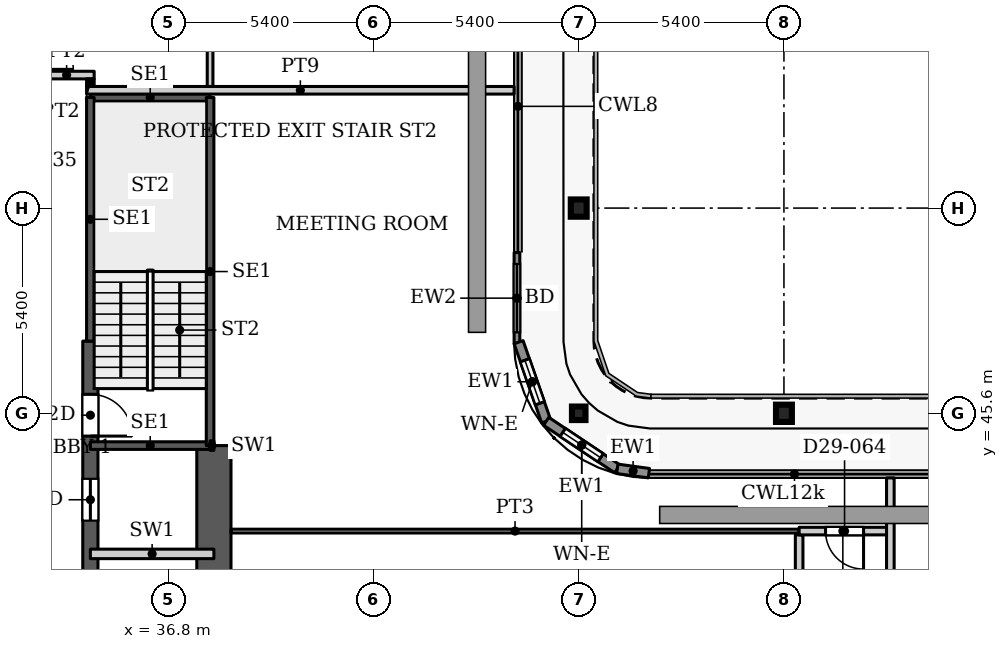
"""IFC4 building model, lengths in metres.
Left out: names, types, materials, properties, quantities, classifications, styles, units other than length and angle.
Written with IfcOpenShell. Run it as: python <this file> out.ifc"""

import sys

from ifc_helpers import new_model, si_unit, direction, frame, frame_2d, origin, origin_2d, place, context, subcontext, project, spatial, rectangle, hollow_rectangle, i_section, extrude, source, transform, mapped, element, fill, save


model = new_model("IFC4")
c1 = context("Model", 3, precision=1e-05, world=origin(), true_north=direction((0.0, 1.0)))
c2 = subcontext(c1, "Body", "Model", "MODEL_VIEW")
j1 = project(units=[si_unit("LENGTHUNIT", "METRE"), si_unit("PLANEANGLEUNIT", "RADIAN")], contexts=[c1])
p1 = place(None, origin())
s1 = spatial("IfcSite", under=j1, at=p1, CompositionType="ELEMENT")
p2 = place(p1, origin())
s2 = spatial("IfcBuilding", under=s1, at=p2, CompositionType="ELEMENT")
p3 = place(p2, frame((0.0, 0.0, 129.2)))
s3 = spatial("IfcBuildingStorey", under=s2, at=p3, CompositionType="ELEMENT", Elevation=129.2)
for number, where, z_axis, x_axis in (
    (1, (53.0, 45.6, 0.0), (0.0, 0.0, 1.0), (1.0, 0.0, 0.0)),
    (2, (47.6, 51.0, 0.0), (0.0, 0.0, 1.0), (1.0, 0.0, 0.0)),
):
    element("IfcColumn", number, at=place(p3, frame(where, z_axis=z_axis, x_axis=x_axis)), inside=s3, PredefinedType="COLUMN", context=c2, shape_type="SweptSolid", body=[
        extrude(i_section(OverallWidth=0.418, OverallDepth=0.455, WebThickness=0.042, FlangeThickness=0.068, FilletRadius=0.014, at=origin_2d()), origin(), (0.0, 0.0, 1.0), 3.9),
    ])
p4 = place(p3, frame((47.6, 45.6, 0.0), z_axis=(0.0, 0.0, 1.0), x_axis=(1.0, 0.0, 0.0)))
e3 = element("IfcColumn", 3, at=p4, inside=s3, PredefinedType="COLUMN", context=c2, shape_type="SweptSolid", body=[
    extrude(hollow_rectangle(XDim=0.356, YDim=0.356, WallThickness=0.016, InnerFilletRadius=0.016, OuterFilletRadius=0.032, at=origin_2d()), origin(), (0.0, 0.0, 1.0), 3.9),
])
p5 = place(p3, frame((34.75, 29.05, 0.0), z_axis=(0.0, 0.0, 1.0), x_axis=(0.0, 1.0, 0.0)))
e4 = element("IfcWall", 4, at=p5, inside=s3, PredefinedType="SHEAR", context=c2, shape_type="SweptSolid", body=[
    extrude(rectangle(XDim=18.45, YDim=0.4, at=frame_2d((9.225, 0.0))), origin(), (0.0, 0.0, 1.0), 3.9),
])
p6 = place(p5, frame((8.025, 0.0, 0.0)))
e5 = element("IfcOpeningElement", 5, at=p6, cuts=e4, PredefinedType="OPENING", context=c2, shape_type="SweptSolid", body=[
    extrude(rectangle(XDim=1.1, YDim=2.2, at=frame_2d((0.55, 1.1))), frame((0.0, 0.21, 0.0), z_axis=(0.0, -1.0, 0.0), x_axis=(1.0, 0.0, 0.0)), (0.0, 0.0, 1.0), 0.42),
])
p7 = place(p5, frame((10.875, 0.0, 0.0)))
e6 = element("IfcOpeningElement", 6, at=p7, cuts=e4, PredefinedType="OPENING", context=c2, shape_type="SweptSolid", body=[
    extrude(rectangle(XDim=1.1, YDim=2.2, at=frame_2d((0.55, 1.1))), frame((0.0, 0.21, 0.0), z_axis=(0.0, -1.0, 0.0), x_axis=(1.0, 0.0, 0.0)), (0.0, 0.0, 1.0), 0.42),
])
p8 = place(p5, frame((13.725, 0.0, 0.0)))
e7 = element("IfcOpeningElement", 7, at=p8, cuts=e4, PredefinedType="OPENING", context=c2, shape_type="SweptSolid", body=[
    extrude(rectangle(XDim=1.1, YDim=2.2, at=frame_2d((0.55, 1.1))), frame((0.0, 0.21, 0.0), z_axis=(0.0, -1.0, 0.0), x_axis=(1.0, 0.0, 0.0)), (0.0, 0.0, 1.0), 0.42),
])
p9 = place(p5, frame((15.95, 0.0, 0.0)))
e8 = element("IfcOpeningElement", 8, at=p9, cuts=e4, PredefinedType="OPENING", context=c2, shape_type="SweptSolid", body=[
    extrude(rectangle(XDim=1.1, YDim=2.2, at=frame_2d((0.55, 1.1))), frame((0.0, 0.21, 0.0), z_axis=(0.0, -1.0, 0.0), x_axis=(1.0, 0.0, 0.0)), (0.0, 0.0, 1.0), 0.42),
])
p10 = place(p3, frame((38.0, 36.2, 0.0), z_axis=(0.0, 0.0, 1.0), x_axis=(0.0, 1.0, 0.0)))
e9 = element("IfcWall", 9, at=p10, inside=s3, PredefinedType="SHEAR", context=c2, shape_type="SweptSolid", body=[
    extrude(rectangle(XDim=8.55, YDim=0.9, at=frame_2d((4.275, 0.0))), origin(), (0.0, 0.0, 1.0), 3.9),
])
p11 = place(p3, frame((45.975, 49.83, 0.0), z_axis=(0.0, 0.0, 1.0), x_axis=(0.0, -1.0, 0.0)))
e10 = element("IfcWall", 10, at=p11, inside=s3, PredefinedType="SOLIDWALL", context=c2, shape_type="SweptSolid", body=[
    extrude(rectangle(XDim=2.4, YDim=0.15, at=frame_2d((1.2, 0.0))), origin(), (0.0, 0.0, 1.0), 3.75),
])
p12 = place(p11, frame((0.3, 0.0, 0.0)))
e11 = element("IfcOpeningElement", 11, at=p12, cuts=e10, PredefinedType="OPENING", context=c2, shape_type="SweptSolid", body=[
    extrude(rectangle(XDim=1.8, YDim=2.4, at=frame_2d((0.9, 1.2))), frame((0.0, 0.085, 0.0), z_axis=(0.0, -1.0, 0.0), x_axis=(1.0, 0.0, 0.0)), (0.0, 0.0, 1.0), 0.17),
])
p13 = place(p3, frame((46.018, 47.471, 0.0), z_axis=(0.0, 0.0, 1.0), x_axis=(0.328791208903, -0.944402637093, 0.0)))
e12 = element("IfcWall", 12, at=p13, inside=s3, PredefinedType="SOLIDWALL", context=c2, shape_type="SweptSolid", body=[
    extrude(rectangle(XDim=2.205, YDim=0.25, at=frame_2d((1.102, 0.0))), origin(), (0.0, 0.0, 1.0), 3.75),
])
p14 = place(p13, frame((0.503, 0.0, 0.6)))
e13 = element("IfcOpeningElement", 13, at=p14, cuts=e12, PredefinedType="OPENING", context=c2, shape_type="SweptSolid", body=[
    extrude(rectangle(XDim=1.2, YDim=2.1, at=frame_2d((0.6, 1.05))), frame((0.0, 0.135, 0.0), z_axis=(0.0, -1.0, 0.0), x_axis=(1.0, 0.0, 0.0)), (0.0, 0.0, 1.0), 0.27),
])
p15 = place(p3, frame((46.743, 45.389, 0.0), z_axis=(0.0, 0.0, 1.0), x_axis=(0.831449265529, -0.555600682912, 0.0)))
e14 = element("IfcWall", 14, at=p15, inside=s3, PredefinedType="SOLIDWALL", context=c2, shape_type="SweptSolid", body=[
    extrude(rectangle(XDim=2.251, YDim=0.25, at=frame_2d((1.126, 0.0))), origin(), (0.0, 0.0, 1.0), 3.75),
])
p16 = place(p15, frame((0.525, 0.0, 0.6)))
e15 = element("IfcOpeningElement", 15, at=p16, cuts=e14, PredefinedType="OPENING", context=c2, shape_type="SweptSolid", body=[
    extrude(rectangle(XDim=1.2, YDim=2.1, at=frame_2d((0.6, 1.05))), frame((0.0, 0.135, 0.0), z_axis=(0.0, -1.0, 0.0), x_axis=(1.0, 0.0, 0.0)), (0.0, 0.0, 1.0), 0.27),
])
p17 = place(p3, frame((48.615, 44.138, 0.0), z_axis=(0.0, 0.0, 1.0), x_axis=(0.990741504246, -0.135761819977, 0.0)))
e16 = element("IfcWall", 16, at=p17, inside=s3, PredefinedType="SOLIDWALL", context=c2, shape_type="SweptSolid", body=[
    extrude(rectangle(XDim=0.84, YDim=0.25, at=frame_2d((0.42, 0.0))), origin(), (0.0, 0.0, 1.0), 3.75),
])
for number, where, z_axis, x_axis in (
    (17, (34.75, 44.75, 0.0), (0.0, 0.0, 1.0), (1.0, 0.0, 0.0)),
    (18, (34.75, 53.91, 0.0), (0.0, 0.0, 1.0), (1.0, 0.0, 0.0)),
):
    element("IfcWall", number, at=place(p3, frame(where, z_axis=z_axis, x_axis=x_axis)), inside=s3, PredefinedType="SHEAR", context=c2, shape_type="SweptSolid", body=[
        extrude(rectangle(XDim=3.15, YDim=0.2, at=frame_2d((1.575, 0.0))), origin(), (0.0, 0.0, 1.0), 3.9),
    ])
p18 = place(p3, frame((34.75, 47.5, 0.0), z_axis=(0.0, 0.0, 1.0), x_axis=(0.0, 1.0, 0.0)))
e19 = element("IfcWall", 19, at=p18, inside=s3, PredefinedType="SHEAR", context=c2, shape_type="SweptSolid", body=[
    extrude(rectangle(XDim=6.41, YDim=0.2, at=frame_2d((3.205, 0.0))), origin(), (0.0, 0.0, 1.0), 3.9),
])
p19 = place(p3, frame((37.9, 44.75, 0.0), z_axis=(0.0, 0.0, 1.0), x_axis=(0.0, 1.0, 0.0)))
e20 = element("IfcWall", 20, at=p19, inside=s3, PredefinedType="SHEAR", context=c2, shape_type="SweptSolid", body=[
    extrude(rectangle(XDim=9.16, YDim=0.2, at=frame_2d((4.58, 0.0))), origin(), (0.0, 0.0, 1.0), 3.9),
])
p20 = place(p3, frame((34.75, 41.9, 0.0), z_axis=(0.0, 0.0, 1.0), x_axis=(1.0, 0.0, 0.0)))
e21 = element("IfcWall", 21, at=p20, inside=s3, PredefinedType="PARTITIONING", context=c2, shape_type="SweptSolid", body=[
    extrude(rectangle(XDim=3.25, YDim=0.25, at=frame_2d((1.625, 0.0))), origin(), (0.0, 0.0, 1.0), 3.9),
])
p21 = place(p3, frame((37.9, 44.75, 0.0), z_axis=(0.0, 0.0, 1.0), x_axis=(1.0, 0.0, 0.0)))
e22 = element("IfcWall", 22, at=p21, inside=s3, PredefinedType="PARTITIONING", context=c2, shape_type="SweptSolid", body=[
    extrude(rectangle(XDim=0.1, YDim=0.25, at=frame_2d((0.05, 0.0))), origin(), (0.0, 0.0, 1.0), 3.9),
])
p22 = place(p3, frame((33.4, 54.5, 0.0), z_axis=(0.0, 0.0, 1.0), x_axis=(1.0, 0.0, 0.0)))
e23 = element("IfcWall", 23, at=p22, inside=s3, PredefinedType="PARTITIONING", context=c2, shape_type="SweptSolid", body=[
    extrude(rectangle(XDim=1.45, YDim=0.2, at=frame_2d((0.725, 0.0))), origin(), (0.0, 0.0, 1.0), 3.6),
])
p23 = place(p3, frame((34.65, 54.1, 0.0), z_axis=(0.0, 0.0, 1.0), x_axis=(1.0, 0.0, 0.0)))
e24 = element("IfcWall", 24, at=p23, inside=s3, PredefinedType="PARTITIONING", context=c2, shape_type="SweptSolid", body=[
    extrude(rectangle(XDim=11.25, YDim=0.2, at=frame_2d((5.625, 0.0))), origin(), (0.0, 0.0, 1.0), 3.6),
])
p24 = place(p3, frame((34.75, 54.2, 0.0), z_axis=(0.0, 0.0, 1.0), x_axis=(0.0, 1.0, 0.0)))
e25 = element("IfcWall", 25, at=p24, inside=s3, PredefinedType="PARTITIONING", context=c2, shape_type="SweptSolid", body=[
    extrude(rectangle(XDim=0.2, YDim=0.2, at=frame_2d((0.1, 0.0))), origin(), (0.0, 0.0, 1.0), 3.6),
])
p25 = place(p3, frame((37.9, 54.2, 0.0), z_axis=(0.0, 0.0, 1.0), x_axis=(0.0, 1.0, 0.0)))
e26 = element("IfcWall", 26, at=p25, inside=s3, PredefinedType="PARTITIONING", context=c2, shape_type="SweptSolid", body=[
    extrude(rectangle(XDim=9.4, YDim=0.15, at=frame_2d((4.7, 0.0))), origin(), (0.0, 0.0, 1.0), 3.6),
])
p26 = place(p25, frame((7.1, 0.0, 0.0)))
e27 = element("IfcOpeningElement", 27, at=p26, cuts=e26, PredefinedType="OPENING", context=c2, shape_type="SweptSolid", body=[
    extrude(rectangle(XDim=0.9, YDim=2.1, at=frame_2d((0.45, 1.05))), frame((0.0, 0.085, 0.0), z_axis=(0.0, -1.0, 0.0), x_axis=(1.0, 0.0, 0.0)), (0.0, 0.0, 1.0), 0.17),
])
p27 = place(p25, frame((2.25, 0.0, 0.0)))
e28 = element("IfcOpeningElement", 28, at=p27, cuts=e26, PredefinedType="OPENING", context=c2, shape_type="SweptSolid", body=[
    extrude(rectangle(XDim=1.0, YDim=2.1, at=frame_2d((0.5, 1.05))), frame((0.0, 0.085, 0.0), z_axis=(0.0, -1.0, 0.0), x_axis=(1.0, 0.0, 0.0)), (0.0, 0.0, 1.0), 0.17),
])
p28 = place(p3, frame((38.449, 42.5, 0.0), z_axis=(0.0, 0.0, 1.0), x_axis=(1.0, 0.0, 0.0)))
e29 = element("IfcWall", 29, at=p28, inside=s3, PredefinedType="PARTITIONING", context=c2, shape_type="SweptSolid", body=[
    extrude(rectangle(XDim=14.951, YDim=0.1, at=frame_2d((7.476, 0.0))), origin(), (0.0, 0.0, 1.0), 3.6),
])
p29 = place(p3, frame((53.4, 36.199, 0.0), z_axis=(0.0, 0.0, 1.0), x_axis=(0.0, 1.0, 0.0)))
e30 = element("IfcWall", 30, at=p29, inside=s3, PredefinedType="PARTITIONING", context=c2, shape_type="SweptSolid", body=[
    extrude(rectangle(XDim=6.201, YDim=0.2, at=frame_2d((3.101, 0.0))), origin(), (0.0, 0.0, 1.0), 3.6),
])
p30 = place(p29, frame((3.707, 0.0, 0.0)))
e31 = element("IfcOpeningElement", 31, at=p30, cuts=e30, PredefinedType="OPENING", context=c2, shape_type="SweptSolid", body=[
    extrude(rectangle(XDim=1.0, YDim=2.1, at=frame_2d((0.5, 1.05))), frame((0.0, 0.11, 0.0), z_axis=(0.0, -1.0, 0.0), x_axis=(1.0, 0.0, 0.0)), (0.0, 0.0, 1.0), 0.22),
])
p31 = place(p3, frame((53.4, 42.5, 0.0), z_axis=(0.0, 0.0, 1.0), x_axis=(1.0, 0.0, 0.0)))
e32 = element("IfcWall", 32, at=p31, inside=s3, PredefinedType="PARTITIONING", context=c2, shape_type="SweptSolid", body=[
    extrude(rectangle(XDim=2.3, YDim=0.2, at=frame_2d((1.15, 0.0))), origin(), (0.0, 0.0, 1.0), 3.6),
])
p32 = place(p31, frame((0.695, 0.0, 0.0)))
e33 = element("IfcOpeningElement", 33, at=p32, cuts=e32, PredefinedType="OPENING", context=c2, shape_type="SweptSolid", body=[
    extrude(rectangle(XDim=1.0, YDim=2.1, at=frame_2d((0.5, 1.05))), frame((0.0, 0.11, 0.0), z_axis=(0.0, -1.0, 0.0), x_axis=(1.0, 0.0, 0.0)), (0.0, 0.0, 1.0), 0.22),
])
p33 = place(p3, frame((55.8, 30.4, 0.0), z_axis=(0.0, 0.0, 1.0), x_axis=(0.0, 1.0, 0.0)))
e34 = element("IfcWall", 34, at=p33, inside=s3, PredefinedType="PARTITIONING", context=c2, shape_type="SweptSolid", body=[
    extrude(rectangle(XDim=13.5, YDim=0.2, at=frame_2d((6.75, 0.0))), origin(), (0.0, 0.0, 1.0), 3.6),
])
m1 = source(origin(), c2, "Body", "SweptSolid", [
    extrude(rectangle(XDim=1.8, YDim=2.4, at=frame_2d((0.9, 1.2))), frame((0.0, 0.025, 0.0), z_axis=(0.0, -1.0, 0.0), x_axis=(1.0, 0.0, 0.0)), (0.0, 0.0, 1.0), 0.05),
])
p34 = place(p12, origin())
e35 = element("IfcDoor", 35, at=p34, inside=s3, OperationType="SLIDING_TO_LEFT", PredefinedType="DOOR", context=c2, shape_type="MappedRepresentation", body=[
    mapped(m1, transform((0.0, 0.0, 0.0), x_axis=(1.0, 0.0, 0.0), y_axis=(0.0, 1.0, 0.0), z_axis=(0.0, 0.0, 1.0), scale=1.0)),
])
fill(e11, e35)
m2 = source(origin(), c2, "Body", "SweptSolid", [
    extrude(rectangle(XDim=1.2, YDim=2.1, at=frame_2d((0.6, 1.05))), frame((0.0, 0.03, 0.0), z_axis=(0.0, -1.0, 0.0), x_axis=(1.0, 0.0, 0.0)), (0.0, 0.0, 1.0), 0.06),
])
p35 = place(p14, origin())
e36 = element("IfcWindow", 36, at=p35, inside=s3, PartitioningType="SINGLE_PANEL", PredefinedType="WINDOW", context=c2, shape_type="MappedRepresentation", body=[
    mapped(m2, transform((0.0, 0.0, 0.0), x_axis=(1.0, 0.0, 0.0), y_axis=(0.0, 1.0, 0.0), z_axis=(0.0, 0.0, 1.0), scale=1.0)),
])
fill(e13, e36)
p36 = place(p16, origin())
e37 = element("IfcWindow", 37, at=p36, inside=s3, PartitioningType="SINGLE_PANEL", PredefinedType="WINDOW", context=c2, shape_type="MappedRepresentation", body=[
    mapped(m2, transform((0.0, 0.0, 0.0), x_axis=(1.0, 0.0, 0.0), y_axis=(0.0, 1.0, 0.0), z_axis=(0.0, 0.0, 1.0), scale=1.0)),
])
fill(e15, e37)
m3 = source(origin(), c2, "Body", "SweptSolid", [
    extrude(rectangle(XDim=1.1, YDim=2.2, at=frame_2d((0.55, 1.1))), frame((0.0, 0.025, 0.0), z_axis=(0.0, -1.0, 0.0), x_axis=(1.0, 0.0, 0.0)), (0.0, 0.0, 1.0), 0.05),
])
p37 = place(p8, origin())
e38 = element("IfcDoor", 38, at=p37, inside=s3, OperationType="SLIDING_TO_LEFT", PredefinedType="DOOR", context=c2, shape_type="MappedRepresentation", body=[
    mapped(m3, transform((0.0, 0.0, 0.0), x_axis=(1.0, 0.0, 0.0), y_axis=(0.0, 1.0, 0.0), z_axis=(0.0, 0.0, 1.0), scale=1.0)),
])
fill(e7, e38)
m4 = source(origin(), c2, "Body", "SweptSolid", [
    extrude(rectangle(XDim=1.1, YDim=2.2, at=frame_2d((0.55, 1.1))), frame((0.0, 0.025, 0.0), z_axis=(0.0, -1.0, 0.0), x_axis=(1.0, 0.0, 0.0)), (0.0, 0.0, 1.0), 0.05),
])
p38 = place(p9, origin())
e39 = element("IfcDoor", 39, at=p38, inside=s3, OperationType="SINGLE_SWING_RIGHT", PredefinedType="DOOR", context=c2, shape_type="MappedRepresentation", body=[
    mapped(m4, transform((0.0, 0.0, 0.0), x_axis=(1.0, 0.0, 0.0), y_axis=(0.0, 1.0, 0.0), z_axis=(0.0, 0.0, 1.0), scale=1.0)),
])
fill(e8, e39)
m5 = source(origin(), c2, "Body", "SweptSolid", [
    extrude(rectangle(XDim=1.0, YDim=2.1, at=frame_2d((0.5, 1.05))), frame((0.0, 0.025, 0.0), z_axis=(0.0, -1.0, 0.0), x_axis=(1.0, 0.0, 0.0)), (0.0, 0.0, 1.0), 0.05),
])
p39 = place(p32, origin())
e40 = element("IfcDoor", 40, at=p39, inside=s3, OperationType="SINGLE_SWING_RIGHT", PredefinedType="DOOR", context=c2, shape_type="MappedRepresentation", body=[
    mapped(m5, transform((0.0, 0.0, 0.0), x_axis=(1.0, 0.0, 0.0), y_axis=(0.0, 1.0, 0.0), z_axis=(0.0, 0.0, 1.0), scale=1.0)),
])
fill(e33, e40)
save(model, sys.argv[1])
